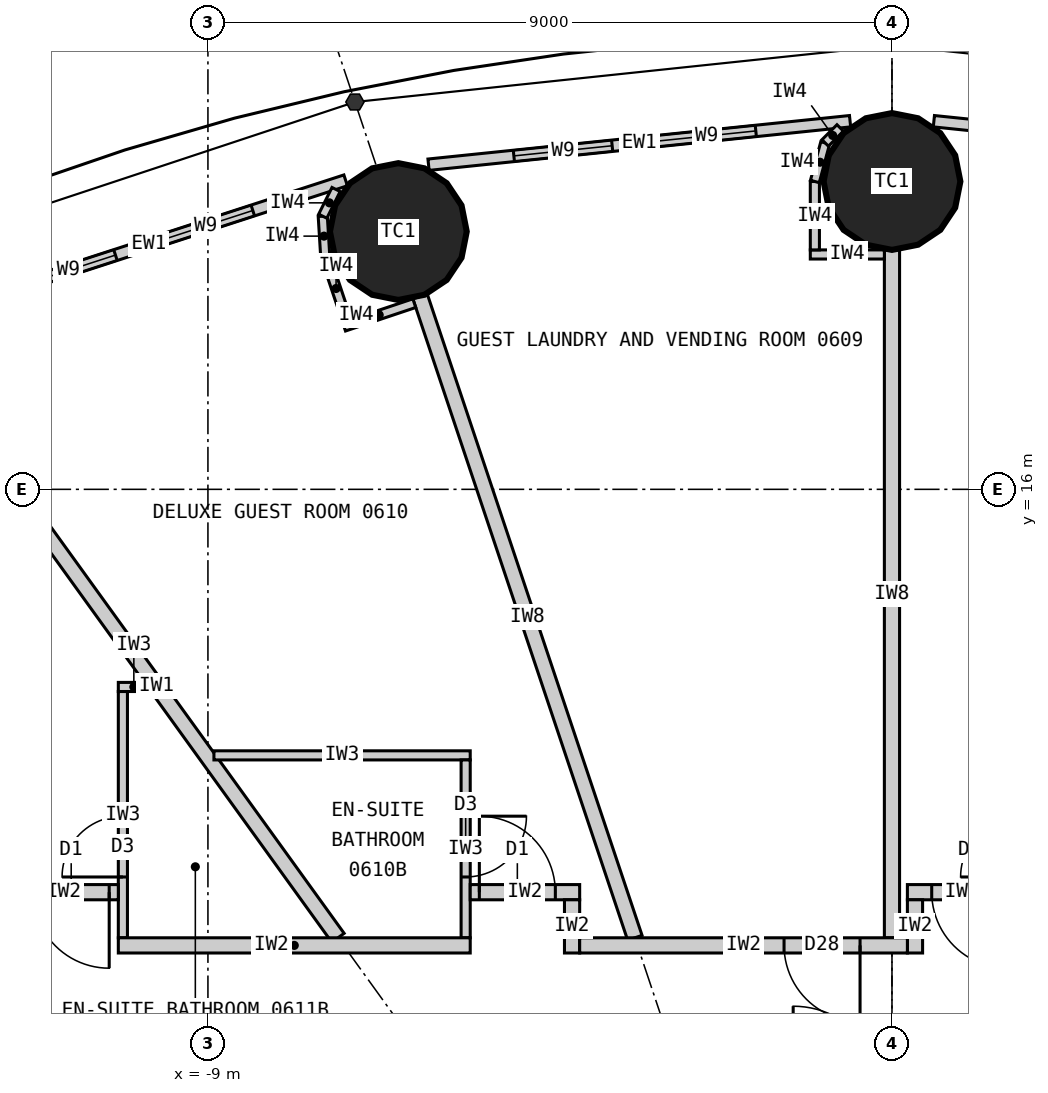
"""IFC4 building model, lengths in metres.
Left out: names, types, materials, properties, quantities, classifications, styles, units other than length and angle.
Written with IfcOpenShell. Run it as: python <this file> out.ifc"""

import sys

from ifc_helpers import new_model, si_unit, direction, frame, frame_2d, origin, origin_2d, place, context, subcontext, project, spatial, rectangle, circle, extrude, element, fill, save


model = new_model("IFC4")
c1 = context("Model", 3, precision=1e-05, world=origin(), true_north=direction((0.0, 1.0)))
c2 = subcontext(c1, "Body", "Model", "MODEL_VIEW")
j1 = project(units=[si_unit("LENGTHUNIT", "METRE"), si_unit("PLANEANGLEUNIT", "RADIAN")], contexts=[c1])
p1 = place(None, origin())
s1 = spatial("IfcSite", under=j1, at=p1, CompositionType="ELEMENT")
p2 = place(p1, origin())
s2 = spatial("IfcBuilding", under=s1, at=p2, CompositionType="ELEMENT")
p3 = place(p2, frame((0.0, 0.0, 32.7)))
s3 = spatial("IfcBuildingStorey", under=s2, at=p3, CompositionType="ELEMENT", Elevation=32.7)
for number, where, z_axis, x_axis in (
    (1, (0.0, 20.05, 0.0), (0.0, 0.0, 1.0), (1.0, 0.0, 0.0)),
    (2, (-6.495, 19.391, 0.0), (0.0, 0.0, 1.0), (1.0, 0.0, 0.0)),
):
    element("IfcColumn", number, at=place(p3, frame(where, z_axis=z_axis, x_axis=x_axis)), inside=s3, PredefinedType="COLUMN", context=c2, shape_type="SweptSolid", body=[
        extrude(circle(Radius=0.9, at=origin_2d()), origin(), (0.0, 0.0, 1.0), 3.3),
    ])
p4 = place(p3, frame((6.098, 20.271, 0.0), z_axis=(0.0, 0.0, 1.0), x_axis=(-0.994723735084, 0.102589915983, 0.0)))
e3 = element("IfcWall", 3, at=p4, inside=s3, PredefinedType="ELEMENTEDWALL", context=c2, shape_type="SweptSolid", body=[
    extrude(rectangle(XDim=5.576, YDim=0.15, at=frame_2d((2.788, 0.0))), origin(), (0.0, 0.0, 1.0), 3.12),
])
p5 = place(p4, frame((1.129, 0.0, 0.9)))
e4 = element("IfcOpeningElement", 4, at=p5, cuts=e3, PredefinedType="OPENING", context=c2, shape_type="SweptSolid", body=[
    extrude(rectangle(XDim=1.3, YDim=1.9, at=frame_2d((0.65, 0.95))), frame((0.0, 0.085, 0.0), z_axis=(0.0, -1.0, 0.0), x_axis=(1.0, 0.0, 0.0)), (0.0, 0.0, 1.0), 0.17),
])
p6 = place(p4, frame((3.029, 0.0, 0.9)))
e5 = element("IfcOpeningElement", 5, at=p6, cuts=e3, PredefinedType="OPENING", context=c2, shape_type="SweptSolid", body=[
    extrude(rectangle(XDim=1.3, YDim=1.9, at=frame_2d((0.65, 0.95))), frame((0.0, 0.085, 0.0), z_axis=(0.0, -1.0, 0.0), x_axis=(1.0, 0.0, 0.0)), (0.0, 0.0, 1.0), 0.17),
])
p7 = place(p3, frame((-0.551, 20.843, 0.0), z_axis=(0.0, 0.0, 1.0), x_axis=(-0.994723735084, -0.102589915983, 0.0)))
e6 = element("IfcWall", 6, at=p7, inside=s3, PredefinedType="ELEMENTEDWALL", context=c2, shape_type="SweptSolid", body=[
    extrude(rectangle(XDim=5.576, YDim=0.15, at=frame_2d((2.788, 0.0))), origin(), (0.0, 0.0, 1.0), 3.12),
])
p8 = place(p7, frame((1.247, 0.0, 0.9)))
e7 = element("IfcOpeningElement", 7, at=p8, cuts=e6, PredefinedType="OPENING", context=c2, shape_type="SweptSolid", body=[
    extrude(rectangle(XDim=1.3, YDim=1.9, at=frame_2d((0.65, 0.95))), frame((0.0, 0.085, 0.0), z_axis=(0.0, -1.0, 0.0), x_axis=(1.0, 0.0, 0.0)), (0.0, 0.0, 1.0), 0.17),
])
p9 = place(p7, frame((3.147, 0.0, 0.9)))
e8 = element("IfcOpeningElement", 8, at=p9, cuts=e6, PredefinedType="OPENING", context=c2, shape_type="SweptSolid", body=[
    extrude(rectangle(XDim=1.3, YDim=1.9, at=frame_2d((0.65, 0.95))), frame((0.0, 0.085, 0.0), z_axis=(0.0, -1.0, 0.0), x_axis=(1.0, 0.0, 0.0)), (0.0, 0.0, 1.0), 0.17),
])
p10 = place(p3, frame((-7.188, 20.065, 0.0), z_axis=(0.0, 0.0, 1.0), x_axis=(-0.951138486029, -0.308764603532, 0.0)))
e9 = element("IfcWall", 9, at=p10, inside=s3, PredefinedType="ELEMENTEDWALL", context=c2, shape_type="SweptSolid", body=[
    extrude(rectangle(XDim=5.444, YDim=0.15, at=frame_2d((2.722, 0.0))), origin(), (0.0, 0.0, 1.0), 3.12),
])
p11 = place(p10, frame((1.284, 0.0, 0.9)))
e10 = element("IfcOpeningElement", 10, at=p11, cuts=e9, PredefinedType="OPENING", context=c2, shape_type="SweptSolid", body=[
    extrude(rectangle(XDim=1.3, YDim=1.9, at=frame_2d((0.65, 0.95))), frame((0.0, 0.085, 0.0), z_axis=(0.0, -1.0, 0.0), x_axis=(1.0, 0.0, 0.0)), (0.0, 0.0, 1.0), 0.17),
])
p12 = place(p10, frame((3.184, 0.0, 0.9)))
e11 = element("IfcOpeningElement", 11, at=p12, cuts=e9, PredefinedType="OPENING", context=c2, shape_type="SweptSolid", body=[
    extrude(rectangle(XDim=1.3, YDim=1.9, at=frame_2d((0.65, 0.95))), frame((0.0, 0.085, 0.0), z_axis=(0.0, -1.0, 0.0), x_axis=(1.0, 0.0, 0.0)), (0.0, 0.0, 1.0), 0.17),
])
p13 = place(p3, frame((0.0, 10.1, 0.0), z_axis=(0.0, 0.0, 1.0), x_axis=(0.0, 1.0, 0.0)))
e12 = element("IfcWall", 12, at=p13, inside=s3, PredefinedType="PARTITIONING", context=c2, shape_type="SweptSolid", body=[
    extrude(rectangle(XDim=9.05, YDim=0.2, at=frame_2d((4.525, 0.0))), origin(), (0.0, 0.0, 1.0), 2.32),
])
p14 = place(p3, frame((-3.383, 10.1, 0.0), z_axis=(0.0, 0.0, 1.0), x_axis=(-0.317593727596, 0.948226884344, 0.0)))
e13 = element("IfcWall", 13, at=p14, inside=s3, PredefinedType="PARTITIONING", context=c2, shape_type="SweptSolid", body=[
    extrude(rectangle(XDim=8.899, YDim=0.2, at=frame_2d((4.449, 0.0))), origin(), (0.0, 0.0, 1.0), 2.32),
])
p15 = place(p3, frame((-7.289, 10.1, 0.0), z_axis=(0.0, 0.0, 1.0), x_axis=(-0.585216319319, 0.810877216108, 0.0)))
e14 = element("IfcWall", 14, at=p15, inside=s3, PredefinedType="PARTITIONING", context=c2, shape_type="SweptSolid", body=[
    extrude(rectangle(XDim=8.16, YDim=0.2, at=frame_2d((4.08, 0.0))), origin(), (0.0, 0.0, 1.0), 2.32),
])
p16 = place(p3, frame((-8.921, 12.5, 0.0), z_axis=(0.0, 0.0, 1.0), x_axis=(1.0, 0.0, 0.0)))
e15 = element("IfcWall", 15, at=p16, inside=s3, PredefinedType="PARTITIONING", context=c2, shape_type="SweptSolid", body=[
    extrude(rectangle(XDim=3.372, YDim=0.12, at=frame_2d((1.686, 0.0))), origin(), (0.0, 0.0, 1.0), 3.12),
])
p17 = place(p3, frame((-5.609, 10.1, 0.0), z_axis=(0.0, 0.0, 1.0), x_axis=(0.0, 1.0, 0.0)))
e16 = element("IfcWall", 16, at=p17, inside=s3, PredefinedType="PARTITIONING", context=c2, shape_type="SweptSolid", body=[
    extrude(rectangle(XDim=2.34, YDim=0.12, at=frame_2d((1.17, 0.0))), origin(), (0.0, 0.0, 1.0), 3.12),
])
p18 = place(p17, frame((0.8, 0.0, 0.0)))
e17 = element("IfcOpeningElement", 17, at=p18, cuts=e16, PredefinedType="OPENING", context=c2, shape_type="SweptSolid", body=[
    extrude(rectangle(XDim=0.8, YDim=2.1, at=frame_2d((0.4, 1.05))), frame((0.0, 0.07, 0.0), z_axis=(0.0, -1.0, 0.0), x_axis=(1.0, 0.0, 0.0)), (0.0, 0.0, 1.0), 0.14),
])
p19 = place(p3, frame((-9.771, 13.4, 0.0), z_axis=(0.0, 0.0, 1.0), x_axis=(-1.0, 0.0, 0.0)))
e18 = element("IfcWall", 18, at=p19, inside=s3, PredefinedType="PARTITIONING", context=c2, shape_type="SweptSolid", body=[
    extrude(rectangle(XDim=0.408, YDim=0.12, at=frame_2d((0.204, 0.0))), origin(), (0.0, 0.0, 1.0), 3.12),
])
p20 = place(p3, frame((-10.119, 10.1, 0.0), z_axis=(0.0, 0.0, 1.0), x_axis=(0.0, 1.0, 0.0)))
e19 = element("IfcWall", 19, at=p20, inside=s3, PredefinedType="PARTITIONING", context=c2, shape_type="SweptSolid", body=[
    extrude(rectangle(XDim=3.24, YDim=0.12, at=frame_2d((1.62, 0.0))), origin(), (0.0, 0.0, 1.0), 3.12),
])
p21 = place(p20, frame((0.8, 0.0, 0.0)))
e20 = element("IfcOpeningElement", 20, at=p21, cuts=e19, PredefinedType="OPENING", context=c2, shape_type="SweptSolid", body=[
    extrude(rectangle(XDim=0.8, YDim=2.1, at=frame_2d((0.4, 1.05))), frame((0.0, 0.07, 0.0), z_axis=(0.0, -1.0, 0.0), x_axis=(1.0, 0.0, 0.0)), (0.0, 0.0, 1.0), 0.14),
])
p22 = place(p3, frame((0.203, 10.7, 0.0), z_axis=(0.0, 0.0, 1.0), x_axis=(1.0, 0.0, 0.0)))
e21 = element("IfcWall", 21, at=p22, inside=s3, PredefinedType="PARTITIONING", context=c2, shape_type="SweptSolid", body=[
    extrude(rectangle(XDim=1.44, YDim=0.2, at=frame_2d((0.72, 0.0))), origin(), (0.0, 0.0, 1.0), 3.12),
])
p23 = place(p22, frame((0.32, 0.0, 0.0)))
e22 = element("IfcOpeningElement", 22, at=p23, cuts=e21, PredefinedType="OPENING", context=c2, shape_type="SweptSolid", body=[
    extrude(rectangle(XDim=1.0, YDim=2.2, at=frame_2d((0.5, 1.1))), frame((0.0, 0.11, 0.0), z_axis=(0.0, -1.0, 0.0), x_axis=(1.0, 0.0, 0.0)), (0.0, 0.0, 1.0), 0.22),
])
p24 = place(p3, frame((0.303, 9.9, 0.0), z_axis=(0.0, 0.0, 1.0), x_axis=(0.0, 1.0, 0.0)))
e23 = element("IfcWall", 23, at=p24, inside=s3, PredefinedType="PARTITIONING", context=c2, shape_type="SweptSolid", body=[
    extrude(rectangle(XDim=0.7, YDim=0.2, at=frame_2d((0.35, 0.0))), origin(), (0.0, 0.0, 1.0), 3.12),
])
p25 = place(p3, frame((-5.549, 10.7, 0.0), z_axis=(0.0, 0.0, 1.0), x_axis=(1.0, 0.0, 0.0)))
e24 = element("IfcWall", 24, at=p25, inside=s3, PredefinedType="PARTITIONING", context=c2, shape_type="SweptSolid", body=[
    extrude(rectangle(XDim=1.44, YDim=0.2, at=frame_2d((0.72, 0.0))), origin(), (0.0, 0.0, 1.0), 3.12),
])
p26 = place(p25, frame((0.12, 0.0, 0.0)))
e25 = element("IfcOpeningElement", 25, at=p26, cuts=e24, PredefinedType="OPENING", context=c2, shape_type="SweptSolid", body=[
    extrude(rectangle(XDim=1.0, YDim=2.2, at=frame_2d((0.5, 1.1))), frame((0.0, 0.11, 0.0), z_axis=(0.0, -1.0, 0.0), x_axis=(1.0, 0.0, 0.0)), (0.0, 0.0, 1.0), 0.22),
])
p27 = place(p3, frame((-4.209, 9.9, 0.0), z_axis=(0.0, 0.0, 1.0), x_axis=(0.0, 1.0, 0.0)))
e26 = element("IfcWall", 26, at=p27, inside=s3, PredefinedType="PARTITIONING", context=c2, shape_type="SweptSolid", body=[
    extrude(rectangle(XDim=0.7, YDim=0.2, at=frame_2d((0.35, 0.0))), origin(), (0.0, 0.0, 1.0), 3.12),
])
p28 = place(p3, frame((-11.619, 10.7, 0.0), z_axis=(0.0, 0.0, 1.0), x_axis=(1.0, 0.0, 0.0)))
e27 = element("IfcWall", 27, at=p28, inside=s3, PredefinedType="PARTITIONING", context=c2, shape_type="SweptSolid", body=[
    extrude(rectangle(XDim=1.44, YDim=0.2, at=frame_2d((0.72, 0.0))), origin(), (0.0, 0.0, 1.0), 3.12),
])
p29 = place(p28, frame((0.32, 0.0, 0.0)))
e28 = element("IfcOpeningElement", 28, at=p29, cuts=e27, PredefinedType="OPENING", context=c2, shape_type="SweptSolid", body=[
    extrude(rectangle(XDim=1.0, YDim=2.2, at=frame_2d((0.5, 1.1))), frame((0.0, 0.11, 0.0), z_axis=(0.0, -1.0, 0.0), x_axis=(1.0, 0.0, 0.0)), (0.0, 0.0, 1.0), 0.22),
])
p30 = place(p3, frame((-10.179, 10.0, 0.0), z_axis=(0.0, 0.0, 1.0), x_axis=(1.0, 0.0, 0.0)))
e29 = element("IfcWall", 29, at=p30, inside=s3, PredefinedType="PARTITIONING", context=c2, shape_type="SweptSolid", body=[
    extrude(rectangle(XDim=4.63, YDim=0.2, at=frame_2d((2.315, 0.0))), origin(), (0.0, 0.0, 1.0), 3.12),
])
p31 = place(p3, frame((-4.109, 10.0, 0.0), z_axis=(0.0, 0.0, 1.0), x_axis=(1.0, 0.0, 0.0)))
e30 = element("IfcWall", 30, at=p31, inside=s3, PredefinedType="PARTITIONING", context=c2, shape_type="SweptSolid", body=[
    extrude(rectangle(XDim=4.312, YDim=0.2, at=frame_2d((2.156, 0.0))), origin(), (0.0, 0.0, 1.0), 3.12),
])
p32 = place(p31, frame((2.689, 0.0, 0.0)))
e31 = element("IfcOpeningElement", 31, at=p32, cuts=e30, PredefinedType="OPENING", context=c2, shape_type="SweptSolid", body=[
    extrude(rectangle(XDim=1.0, YDim=2.2, at=frame_2d((0.5, 1.1))), frame((0.0, 0.11, 0.0), z_axis=(0.0, -1.0, 0.0), x_axis=(1.0, 0.0, 0.0)), (0.0, 0.0, 1.0), 0.22),
])
p33 = place(p3, frame((-0.1, 19.09, 0.0), z_axis=(0.0, 0.0, 1.0), x_axis=(-1.0, 0.0, 0.0)))
e32 = element("IfcWall", 32, at=p33, inside=s3, PredefinedType="PARTITIONING", context=c2, shape_type="SweptSolid", body=[
    extrude(rectangle(XDim=0.974, YDim=0.12, at=frame_2d((0.487, 0.0))), origin(), (0.0, 0.0, 1.0), 3.12),
])
p34 = place(p3, frame((-1.015, 19.15, 0.0), z_axis=(0.0, 0.0, 1.0), x_axis=(0.0, 1.0, 0.0)))
e33 = element("IfcWall", 33, at=p34, inside=s3, PredefinedType="PARTITIONING", context=c2, shape_type="SweptSolid", body=[
    extrude(rectangle(XDim=0.9, YDim=0.12, at=frame_2d((0.45, 0.0))), origin(), (0.0, 0.0, 1.0), 3.12),
])
p35 = place(p3, frame((-1.015, 20.05, 0.0), z_axis=(0.0, 0.0, 1.0), x_axis=(0.258906465625, 0.96590239779, 0.0)))
e34 = element("IfcWall", 34, at=p35, inside=s3, PredefinedType="PARTITIONING", context=c2, shape_type="SweptSolid", body=[
    extrude(rectangle(XDim=0.525, YDim=0.12, at=frame_2d((0.263, 0.0))), origin(), (0.0, 0.0, 1.0), 3.12),
])
p36 = place(p3, frame((-0.879, 20.557, 0.0), z_axis=(0.0, 0.0, 1.0), x_axis=(0.707106781187, 0.707106781187, 0.0)))
e35 = element("IfcWall", 35, at=p36, inside=s3, PredefinedType="PARTITIONING", context=c2, shape_type="SweptSolid", body=[
    extrude(rectangle(XDim=0.279, YDim=0.12, at=frame_2d((0.14, 0.0))), origin(), (0.0, 0.0, 1.0), 3.12),
])
p37 = place(p3, frame((-6.285, 18.449, 0.0), z_axis=(0.0, 0.0, 1.0), x_axis=(-0.948281677008, -0.317430088446, 0.0)))
e36 = element("IfcWall", 36, at=p37, inside=s3, PredefinedType="PARTITIONING", context=c2, shape_type="SweptSolid", body=[
    extrude(rectangle(XDim=0.974, YDim=0.12, at=frame_2d((0.487, 0.0))), origin(), (0.0, 0.0, 1.0), 3.12),
])
p38 = place(p3, frame((-7.171, 18.216, 0.0), z_axis=(0.0, 0.0, 1.0), x_axis=(-0.317692409458, 0.94819382669, 0.0)))
e37 = element("IfcWall", 37, at=p38, inside=s3, PredefinedType="PARTITIONING", context=c2, shape_type="SweptSolid", body=[
    extrude(rectangle(XDim=0.9, YDim=0.12, at=frame_2d((0.45, 0.0))), origin(), (0.0, 0.0, 1.0), 3.12),
])
p39 = place(p3, frame((-7.457, 19.069, 0.0), z_axis=(0.0, 0.0, 1.0), x_axis=(-0.061365267648, 0.99811537606, 0.0)))
e38 = element("IfcWall", 38, at=p39, inside=s3, PredefinedType="PARTITIONING", context=c2, shape_type="SweptSolid", body=[
    extrude(rectangle(XDim=0.525, YDim=0.12, at=frame_2d((0.263, 0.0))), origin(), (0.0, 0.0, 1.0), 3.12),
])
p40 = place(p3, frame((-7.489, 19.593, 0.0), z_axis=(0.0, 0.0, 1.0), x_axis=(0.446218959337, 0.89492381817, 0.0)))
e39 = element("IfcWall", 39, at=p40, inside=s3, PredefinedType="PARTITIONING", context=c2, shape_type="SweptSolid", body=[
    extrude(rectangle(XDim=0.393, YDim=0.12, at=frame_2d((0.196, 0.0))), origin(), (0.0, 0.0, 1.0), 3.12),
])
p41 = place(p8, origin())
e40 = element("IfcWindow", 40, at=p41, inside=s3, PartitioningType="SINGLE_PANEL", PredefinedType="WINDOW", context=c2, shape_type="SweptSolid", body=[
    extrude(rectangle(XDim=1.3, YDim=1.9, at=frame_2d((0.65, 0.95))), frame((0.0, 0.03, 0.0), z_axis=(0.0, -1.0, 0.0), x_axis=(1.0, 0.0, 0.0)), (0.0, 0.0, 1.0), 0.06),
])
fill(e7, e40)
p42 = place(p9, origin())
e41 = element("IfcWindow", 41, at=p42, inside=s3, PartitioningType="SINGLE_PANEL", PredefinedType="WINDOW", context=c2, shape_type="SweptSolid", body=[
    extrude(rectangle(XDim=1.3, YDim=1.9, at=frame_2d((0.65, 0.95))), frame((0.0, 0.03, 0.0), z_axis=(0.0, -1.0, 0.0), x_axis=(1.0, 0.0, 0.0)), (0.0, 0.0, 1.0), 0.06),
])
fill(e8, e41)
p43 = place(p11, origin())
e42 = element("IfcWindow", 42, at=p43, inside=s3, PartitioningType="SINGLE_PANEL", PredefinedType="WINDOW", context=c2, shape_type="SweptSolid", body=[
    extrude(rectangle(XDim=1.3, YDim=1.9, at=frame_2d((0.65, 0.95))), frame((0.0, 0.03, 0.0), z_axis=(0.0, -1.0, 0.0), x_axis=(1.0, 0.0, 0.0)), (0.0, 0.0, 1.0), 0.06),
])
fill(e10, e42)
p44 = place(p12, origin())
e43 = element("IfcWindow", 43, at=p44, inside=s3, PartitioningType="SINGLE_PANEL", PredefinedType="WINDOW", context=c2, shape_type="SweptSolid", body=[
    extrude(rectangle(XDim=1.3, YDim=1.9, at=frame_2d((0.65, 0.95))), frame((0.0, 0.03, 0.0), z_axis=(0.0, -1.0, 0.0), x_axis=(1.0, 0.0, 0.0)), (0.0, 0.0, 1.0), 0.06),
])
fill(e11, e43)
p45 = place(p23, origin())
e44 = element("IfcDoor", 44, at=p45, inside=s3, OperationType="SINGLE_SWING_RIGHT", PredefinedType="DOOR", context=c2, shape_type="SweptSolid", body=[
    extrude(rectangle(XDim=1.0, YDim=2.2, at=frame_2d((0.5, 1.1))), frame((0.0, 0.025, 0.0), z_axis=(0.0, -1.0, 0.0), x_axis=(1.0, 0.0, 0.0)), (0.0, 0.0, 1.0), 0.05),
])
fill(e22, e44)
p46 = place(p32, origin())
e45 = element("IfcDoor", 45, at=p46, inside=s3, OperationType="SINGLE_SWING_RIGHT", PredefinedType="DOOR", context=c2, shape_type="SweptSolid", body=[
    extrude(rectangle(XDim=1.0, YDim=2.2, at=frame_2d((0.5, 1.1))), frame((0.0, 0.025, 0.0), z_axis=(0.0, -1.0, 0.0), x_axis=(1.0, 0.0, 0.0)), (0.0, 0.0, 1.0), 0.05),
])
fill(e31, e45)
p47 = place(p18, origin())
e46 = element("IfcDoor", 46, at=p47, inside=s3, OperationType="SINGLE_SWING_RIGHT", PredefinedType="DOOR", context=c2, shape_type="SweptSolid", body=[
    extrude(rectangle(XDim=0.8, YDim=2.1, at=frame_2d((0.4, 1.05))), frame((0.0, 0.025, 0.0), z_axis=(0.0, -1.0, 0.0), x_axis=(1.0, 0.0, 0.0)), (0.0, 0.0, 1.0), 0.05),
])
fill(e17, e46)
p48 = place(p26, origin())
e47 = element("IfcDoor", 47, at=p48, inside=s3, OperationType="SINGLE_SWING_LEFT", PredefinedType="DOOR", context=c2, shape_type="SweptSolid", body=[
    extrude(rectangle(XDim=1.0, YDim=2.2, at=frame_2d((0.5, 1.1))), frame((0.0, 0.025, 0.0), z_axis=(0.0, -1.0, 0.0), x_axis=(1.0, 0.0, 0.0)), (0.0, 0.0, 1.0), 0.05),
])
fill(e25, e47)
p49 = place(p21, origin())
e48 = element("IfcDoor", 48, at=p49, inside=s3, OperationType="SINGLE_SWING_LEFT", PredefinedType="DOOR", context=c2, shape_type="SweptSolid", body=[
    extrude(rectangle(XDim=0.8, YDim=2.1, at=frame_2d((0.4, 1.05))), frame((0.0, 0.025, 0.0), z_axis=(0.0, -1.0, 0.0), x_axis=(1.0, 0.0, 0.0)), (0.0, 0.0, 1.0), 0.05),
])
fill(e20, e48)
p50 = place(p29, origin())
e49 = element("IfcDoor", 49, at=p50, inside=s3, OperationType="SINGLE_SWING_RIGHT", PredefinedType="DOOR", context=c2, shape_type="SweptSolid", body=[
    extrude(rectangle(XDim=1.0, YDim=2.2, at=frame_2d((0.5, 1.1))), frame((0.0, 0.025, 0.0), z_axis=(0.0, -1.0, 0.0), x_axis=(1.0, 0.0, 0.0)), (0.0, 0.0, 1.0), 0.05),
])
fill(e28, e49)
save(model, sys.argv[1])
